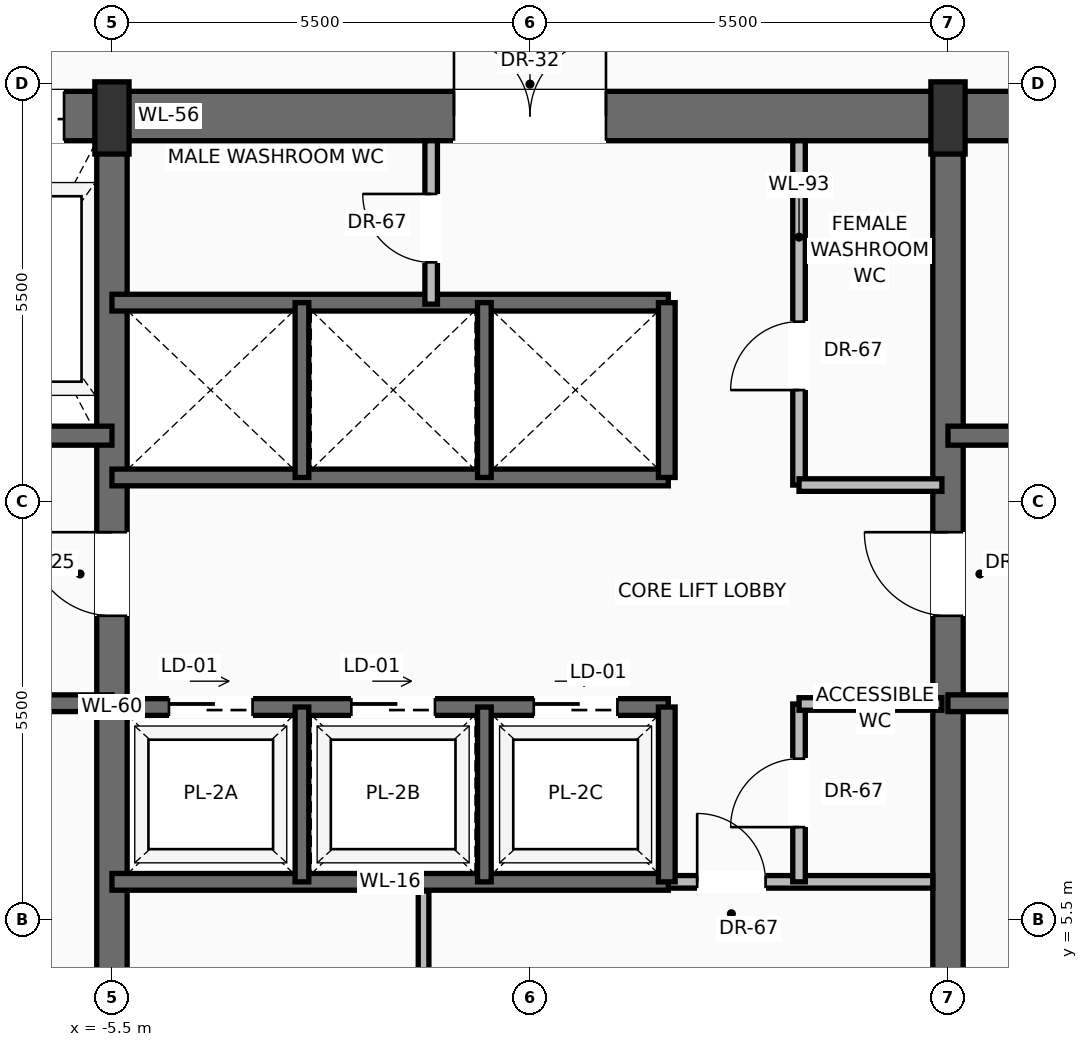
"""IFC4 building model, lengths in metres.
Left out: names, types, materials, properties, quantities, classifications, styles, units other than length and angle.
Written with IfcOpenShell. Run it as: python <this file> out.ifc"""

import sys

from ifc_helpers import new_model, si_unit, direction, frame, frame_2d, origin, origin_2d, place, context, subcontext, project, spatial, rectangle, extrude, source, transform, mapped, element, fill, save


model = new_model("IFC4")
c1 = context("Model", 3, precision=1e-05, world=origin(), true_north=direction((0.0, 1.0)))
c2 = subcontext(c1, "Body", "Model", "MODEL_VIEW")
j1 = project(units=[si_unit("LENGTHUNIT", "METRE"), si_unit("PLANEANGLEUNIT", "RADIAN")], contexts=[c1])
p1 = place(None, origin())
s1 = spatial("IfcSite", under=j1, at=p1, CompositionType="ELEMENT")
p2 = place(p1, origin())
s2 = spatial("IfcBuilding", under=s1, at=p2, CompositionType="ELEMENT")
p3 = place(p2, frame((0.0, 0.0, 136.7)))
s3 = spatial("IfcBuildingStorey", under=s2, at=p3, CompositionType="ELEMENT", Elevation=136.7)
p4 = place(p3, frame((-10.8, 16.075, 0.0), z_axis=(0.0, 0.0, 1.0), x_axis=(1.0, 0.0, 0.0)))
e1 = element("IfcWall", 1, at=p4, inside=s3, PredefinedType="SHEAR", context=c2, shape_type="SweptSolid", body=[
    extrude(rectangle(XDim=21.6, YDim=0.65, at=frame_2d((10.8, 0.0))), origin(), (0.0, 0.0, 1.0), 3.47),
])
p5 = place(p4, frame((3.37, 0.0, 0.0)))
e2 = element("IfcOpeningElement", 2, at=p5, cuts=e1, PredefinedType="OPENING", context=c2, shape_type="SweptSolid", body=[
    extrude(rectangle(XDim=1.3, YDim=2.3, at=frame_2d((0.65, 1.15))), frame((0.0, 0.335, 0.0), z_axis=(0.0, -1.0, 0.0), x_axis=(1.0, 0.0, 0.0)), (0.0, 0.0, 1.0), 0.67),
])
p6 = place(p4, frame((9.8, 0.0, 0.0)))
e3 = element("IfcOpeningElement", 3, at=p6, cuts=e1, PredefinedType="OPENING", context=c2, shape_type="SweptSolid", body=[
    extrude(rectangle(XDim=2.0, YDim=2.4, at=frame_2d((1.0, 1.2))), frame((0.0, 0.335, 0.0), z_axis=(0.0, -1.0, 0.0), x_axis=(1.0, 0.0, 0.0)), (0.0, 0.0, 1.0), 0.67),
])
p7 = place(p3, frame((-5.5, 0.525, 0.0), z_axis=(0.0, 0.0, 1.0), x_axis=(0.0, 1.0, 0.0)))
e4 = element("IfcWall", 4, at=p7, inside=s3, PredefinedType="SHEAR", context=c2, shape_type="SweptSolid", body=[
    extrude(rectangle(XDim=15.55, YDim=0.4, at=frame_2d((7.775, 0.0))), origin(), (0.0, 0.0, 1.0), 3.47),
])
p8 = place(p7, frame((8.975, 0.0, 0.0)))
e5 = element("IfcOpeningElement", 5, at=p8, cuts=e4, PredefinedType="OPENING", context=c2, shape_type="SweptSolid", body=[
    extrude(rectangle(XDim=1.1, YDim=2.2, at=frame_2d((0.55, 1.1))), frame((0.0, 0.21, 0.0), z_axis=(0.0, -1.0, 0.0), x_axis=(1.0, 0.0, 0.0)), (0.0, 0.0, 1.0), 0.42),
])
p9 = place(p3, frame((5.5, 0.525, 0.0), z_axis=(0.0, 0.0, 1.0), x_axis=(0.0, 1.0, 0.0)))
e6 = element("IfcWall", 6, at=p9, inside=s3, PredefinedType="SHEAR", context=c2, shape_type="SweptSolid", body=[
    extrude(rectangle(XDim=15.55, YDim=0.4, at=frame_2d((7.775, 0.0))), origin(), (0.0, 0.0, 1.0), 3.47),
])
p10 = place(p9, frame((8.975, 0.0, 0.0)))
e7 = element("IfcOpeningElement", 7, at=p10, cuts=e6, PredefinedType="OPENING", context=c2, shape_type="SweptSolid", body=[
    extrude(rectangle(XDim=1.1, YDim=2.2, at=frame_2d((0.55, 1.1))), frame((0.0, 0.21, 0.0), z_axis=(0.0, -1.0, 0.0), x_axis=(1.0, 0.0, 0.0)), (0.0, 0.0, 1.0), 0.42),
])
m1 = source(origin(), c2, "Body", "SweptSolid", [
    extrude(rectangle(XDim=0.45, YDim=0.95, at=origin_2d()), origin(), (0.0, 0.0, 1.0), 3.7),
])
for number, where, z_axis, x_axis in (
    (8, (-5.5, 16.05, 0.0), (0.0, 0.0, 1.0), (1.0, 0.0, 0.0)),
    (9, (5.5, 16.05, 0.0), (0.0, 0.0, 1.0), (1.0, 0.0, 0.0)),
):
    element("IfcColumn", number, at=place(p3, frame(where, z_axis=z_axis, x_axis=x_axis)), inside=s3, PredefinedType="PILASTER", context=c2, shape_type="MappedRepresentation", body=[
        mapped(m1, transform((0.0, 0.0, 0.0), scale=1.0)),
    ])
p11 = place(p3, frame((-5.5, 8.35, 0.0), z_axis=(0.0, 0.0, 1.0), x_axis=(-1.0, 0.0, 0.0)))
e10 = element("IfcWall", 10, at=p11, inside=s3, PredefinedType="SOLIDWALL", context=c2, shape_type="SweptSolid", body=[
    extrude(rectangle(XDim=4.65, YDim=0.22, at=frame_2d((2.325, 0.0))), origin(), (0.0, 0.0, 1.0), 3.47),
])
p12 = place(p11, frame((2.5, 0.0, 0.0)))
e11 = element("IfcOpeningElement", 11, at=p12, cuts=e10, PredefinedType="OPENING", context=c2, shape_type="SweptSolid", body=[
    extrude(rectangle(XDim=1.15, YDim=2.2, at=frame_2d((0.575, 1.1))), frame((0.0, 0.12, 0.0), z_axis=(0.0, -1.0, 0.0), x_axis=(1.0, 0.0, 0.0)), (0.0, 0.0, 1.0), 0.24),
])
p13 = place(p3, frame((-5.5, 11.87, 0.0), z_axis=(0.0, 0.0, 1.0), x_axis=(-1.0, 0.0, 0.0)))
e12 = element("IfcWall", 12, at=p13, inside=s3, PredefinedType="SOLIDWALL", context=c2, shape_type="SweptSolid", body=[
    extrude(rectangle(XDim=4.65, YDim=0.25, at=frame_2d((2.325, 0.0))), origin(), (0.0, 0.0, 1.0), 3.47),
])
p14 = place(p13, frame((2.95, 0.0, 0.0)))
e13 = element("IfcOpeningElement", 13, at=p14, cuts=e12, PredefinedType="OPENING", context=c2, shape_type="SweptSolid", body=[
    extrude(rectangle(XDim=1.2, YDim=2.25, at=frame_2d((0.6, 1.125))), frame((0.0, 0.135, 0.0), z_axis=(0.0, -1.0, 0.0), x_axis=(1.0, 0.0, 0.0)), (0.0, 0.0, 1.0), 0.27),
])
p15 = place(p3, frame((10.15, 8.35, 0.0), z_axis=(0.0, 0.0, 1.0), x_axis=(-1.0, 0.0, 0.0)))
e14 = element("IfcWall", 14, at=p15, inside=s3, PredefinedType="SOLIDWALL", context=c2, shape_type="SweptSolid", body=[
    extrude(rectangle(XDim=4.65, YDim=0.22, at=frame_2d((2.325, 0.0))), origin(), (0.0, 0.0, 1.0), 3.47),
])
p16 = place(p15, frame((1.0, 0.0, 0.0)))
e15 = element("IfcOpeningElement", 15, at=p16, cuts=e14, PredefinedType="OPENING", context=c2, shape_type="SweptSolid", body=[
    extrude(rectangle(XDim=1.15, YDim=2.2, at=frame_2d((0.575, 1.1))), frame((0.0, 0.12, 0.0), z_axis=(0.0, -1.0, 0.0), x_axis=(1.0, 0.0, 0.0)), (0.0, 0.0, 1.0), 0.24),
])
p17 = place(p3, frame((10.15, 11.87, 0.0), z_axis=(0.0, 0.0, 1.0), x_axis=(-1.0, 0.0, 0.0)))
e16 = element("IfcWall", 16, at=p17, inside=s3, PredefinedType="SOLIDWALL", context=c2, shape_type="SweptSolid", body=[
    extrude(rectangle(XDim=4.65, YDim=0.25, at=frame_2d((2.325, 0.0))), origin(), (0.0, 0.0, 1.0), 3.47),
])
p18 = place(p17, frame((0.5, 0.0, 0.0)))
e17 = element("IfcOpeningElement", 17, at=p18, cuts=e16, PredefinedType="OPENING", context=c2, shape_type="SweptSolid", body=[
    extrude(rectangle(XDim=1.2, YDim=2.25, at=frame_2d((0.6, 1.125))), frame((0.0, 0.135, 0.0), z_axis=(0.0, -1.0, 0.0), x_axis=(1.0, 0.0, 0.0)), (0.0, 0.0, 1.0), 0.27),
])
p19 = place(p3, frame((1.82, 6.0, 0.0), z_axis=(0.0, 0.0, 1.0), x_axis=(1.0, 0.0, 0.0)))
e18 = element("IfcWall", 18, at=p19, inside=s3, PredefinedType="PARTITIONING", context=c2, shape_type="SweptSolid", body=[
    extrude(rectangle(XDim=3.48, YDim=0.165, at=frame_2d((1.74, 0.0))), origin(), (0.0, 0.0, 1.0), 3.462),
])
p20 = place(p19, frame((0.38, 0.0, 0.0)))
e19 = element("IfcOpeningElement", 19, at=p20, cuts=e18, PredefinedType="OPENING", context=c2, shape_type="SweptSolid", body=[
    extrude(rectangle(XDim=0.9, YDim=2.1, at=frame_2d((0.45, 1.05))), frame((0.0, 0.093, 0.0), z_axis=(0.0, -1.0, 0.0), x_axis=(1.0, 0.0, 0.0)), (0.0, 0.0, 1.0), 0.185),
])
p21 = place(p3, frame((-1.4, 0.85, 0.0), z_axis=(0.0, 0.0, 1.0), x_axis=(0.0, 1.0, 0.0)))
e20 = element("IfcWall", 20, at=p21, inside=s3, PredefinedType="PARTITIONING", context=c2, shape_type="SweptSolid", body=[
    extrude(rectangle(XDim=5.03, YDim=0.14, at=frame_2d((2.515, 0.0))), origin(), (0.0, 0.0, 1.0), 3.462),
])
p22 = place(p21, frame((2.1, 0.0, 0.0)))
e21 = element("IfcOpeningElement", 21, at=p22, cuts=e20, PredefinedType="OPENING", context=c2, shape_type="SweptSolid", body=[
    extrude(rectangle(XDim=0.9, YDim=2.1, at=frame_2d((0.45, 1.05))), frame((0.0, 0.08, 0.0), z_axis=(0.0, -1.0, 0.0), x_axis=(1.0, 0.0, 0.0)), (0.0, 0.0, 1.0), 0.16),
])
p23 = place(p3, frame((3.54, 6.0, 0.0), z_axis=(0.0, 0.0, 1.0), x_axis=(0.0, 1.0, 0.0)))
e22 = element("IfcWall", 22, at=p23, inside=s3, PredefinedType="PARTITIONING", context=c2, shape_type="SweptSolid", body=[
    extrude(rectangle(XDim=2.34, YDim=0.165, at=frame_2d((1.17, 0.0))), origin(), (0.0, 0.0, 1.0), 3.462),
])
p24 = place(p23, frame((0.72, 0.0, 0.0)))
e23 = element("IfcOpeningElement", 23, at=p24, cuts=e22, PredefinedType="OPENING", context=c2, shape_type="SweptSolid", body=[
    extrude(rectangle(XDim=0.9, YDim=2.1, at=frame_2d((0.45, 1.05))), frame((0.0, 0.093, 0.0), z_axis=(0.0, -1.0, 0.0), x_axis=(1.0, 0.0, 0.0)), (0.0, 0.0, 1.0), 0.185),
])
p25 = place(p3, frame((3.54, 8.34, 0.0), z_axis=(0.0, 0.0, 1.0), x_axis=(1.0, 0.0, 0.0)))
e24 = element("IfcWall", 24, at=p25, inside=s3, PredefinedType="PARTITIONING", context=c2, shape_type="SweptSolid", body=[
    extrude(rectangle(XDim=1.88, YDim=0.165, at=frame_2d((0.94, 0.0))), origin(), (0.0, 0.0, 1.0), 3.462),
])
p26 = place(p3, frame((-5.5, 6.0, 0.0), z_axis=(0.0, 0.0, 1.0), x_axis=(1.0, 0.0, 0.0)))
e25 = element("IfcWall", 25, at=p26, inside=s3, PredefinedType="SOLIDWALL", context=c2, shape_type="SweptSolid", body=[
    extrude(rectangle(XDim=7.32, YDim=0.22, at=frame_2d((3.66, 0.0))), origin(), (0.0, 0.0, 1.0), 3.47),
])
p27 = place(p3, frame((-5.5, 8.3, 0.0), z_axis=(0.0, 0.0, 1.0), x_axis=(1.0, 0.0, 0.0)))
e26 = element("IfcWall", 26, at=p27, inside=s3, PredefinedType="SOLIDWALL", context=c2, shape_type="SweptSolid", body=[
    extrude(rectangle(XDim=7.32, YDim=0.22, at=frame_2d((3.66, 0.0))), origin(), (0.0, 0.0, 1.0), 3.47),
])
p28 = place(p27, frame((0.75, 0.0, 0.0)))
e27 = element("IfcOpeningElement", 27, at=p28, cuts=e26, PredefinedType="OPENING", context=c2, shape_type="SweptSolid", body=[
    extrude(rectangle(XDim=1.1, YDim=2.2, at=frame_2d((0.55, 1.1))), frame((0.0, 0.12, 0.0), z_axis=(0.0, -1.0, 0.0), x_axis=(1.0, 0.0, 0.0)), (0.0, 0.0, 1.0), 0.24),
])
p29 = place(p27, frame((3.15, 0.0, 0.0)))
e28 = element("IfcOpeningElement", 28, at=p29, cuts=e26, PredefinedType="OPENING", context=c2, shape_type="SweptSolid", body=[
    extrude(rectangle(XDim=1.1, YDim=2.2, at=frame_2d((0.55, 1.1))), frame((0.0, 0.12, 0.0), z_axis=(0.0, -1.0, 0.0), x_axis=(1.0, 0.0, 0.0)), (0.0, 0.0, 1.0), 0.24),
])
p30 = place(p27, frame((5.55, 0.0, 0.0)))
e29 = element("IfcOpeningElement", 29, at=p30, cuts=e26, PredefinedType="OPENING", context=c2, shape_type="SweptSolid", body=[
    extrude(rectangle(XDim=1.1, YDim=2.2, at=frame_2d((0.55, 1.1))), frame((0.0, 0.12, 0.0), z_axis=(0.0, -1.0, 0.0), x_axis=(1.0, 0.0, 0.0)), (0.0, 0.0, 1.0), 0.24),
])
p31 = place(p3, frame((1.8, 6.0, 0.0), z_axis=(0.0, 0.0, 1.0), x_axis=(0.0, 1.0, 0.0)))
e30 = element("IfcWall", 30, at=p31, inside=s3, PredefinedType="SOLIDWALL", context=c2, shape_type="SweptSolid", body=[
    extrude(rectangle(XDim=2.3, YDim=0.22, at=frame_2d((1.15, 0.0))), origin(), (0.0, 0.0, 1.0), 3.47),
])
for number, where, z_axis, x_axis in (
    (31, (-3.0, 6.0, 0.0), (0.0, 0.0, 1.0), (0.0, 1.0, 0.0)),
    (32, (-0.6, 6.0, 0.0), (0.0, 0.0, 1.0), (0.0, 1.0, 0.0)),
):
    element("IfcWall", number, at=place(p3, frame(where, z_axis=z_axis, x_axis=x_axis)), inside=s3, PredefinedType="SOLIDWALL", context=c2, shape_type="SweptSolid", body=[
        extrude(rectangle(XDim=2.3, YDim=0.18, at=frame_2d((1.15, 0.0))), origin(), (0.0, 0.0, 1.0), 3.47),
    ])
for number, where, z_axis, x_axis in (
    (33, (-5.5, 11.32, 0.0), (0.0, 0.0, 1.0), (1.0, 0.0, 0.0)),
    (34, (-5.5, 13.62, 0.0), (0.0, 0.0, 1.0), (1.0, 0.0, 0.0)),
):
    element("IfcWall", number, at=place(p3, frame(where, z_axis=z_axis, x_axis=x_axis)), inside=s3, PredefinedType="SOLIDWALL", context=c2, shape_type="SweptSolid", body=[
        extrude(rectangle(XDim=7.32, YDim=0.22, at=frame_2d((3.66, 0.0))), origin(), (0.0, 0.0, 1.0), 3.47),
    ])
p32 = place(p3, frame((1.8, 11.32, 0.0), z_axis=(0.0, 0.0, 1.0), x_axis=(0.0, 1.0, 0.0)))
e35 = element("IfcWall", 35, at=p32, inside=s3, PredefinedType="SOLIDWALL", context=c2, shape_type="SweptSolid", body=[
    extrude(rectangle(XDim=2.3, YDim=0.22, at=frame_2d((1.15, 0.0))), origin(), (0.0, 0.0, 1.0), 3.47),
])
for number, where, z_axis, x_axis in (
    (36, (-3.0, 11.32, 0.0), (0.0, 0.0, 1.0), (0.0, 1.0, 0.0)),
    (37, (-0.6, 11.32, 0.0), (0.0, 0.0, 1.0), (0.0, 1.0, 0.0)),
):
    element("IfcWall", number, at=place(p3, frame(where, z_axis=z_axis, x_axis=x_axis)), inside=s3, PredefinedType="SOLIDWALL", context=c2, shape_type="SweptSolid", body=[
        extrude(rectangle(XDim=2.3, YDim=0.18, at=frame_2d((1.15, 0.0))), origin(), (0.0, 0.0, 1.0), 3.47),
    ])
p33 = place(p3, frame((-1.3, 13.6, 0.0), z_axis=(0.0, 0.0, 1.0), x_axis=(0.0, 1.0, 0.0)))
e38 = element("IfcWall", 38, at=p33, inside=s3, PredefinedType="PARTITIONING", context=c2, shape_type="SweptSolid", body=[
    extrude(rectangle(XDim=2.15, YDim=0.165, at=frame_2d((1.075, 0.0))), origin(), (0.0, 0.0, 1.0), 3.462),
])
p34 = place(p33, frame((0.55, 0.0, 0.0)))
e39 = element("IfcOpeningElement", 39, at=p34, cuts=e38, PredefinedType="OPENING", context=c2, shape_type="SweptSolid", body=[
    extrude(rectangle(XDim=0.9, YDim=2.1, at=frame_2d((0.45, 1.05))), frame((0.0, 0.093, 0.0), z_axis=(0.0, -1.0, 0.0), x_axis=(1.0, 0.0, 0.0)), (0.0, 0.0, 1.0), 0.185),
])
p35 = place(p3, frame((3.54, 11.22, 0.0), z_axis=(0.0, 0.0, 1.0), x_axis=(0.0, 1.0, 0.0)))
e40 = element("IfcWall", 40, at=p35, inside=s3, PredefinedType="PARTITIONING", context=c2, shape_type="SweptSolid", body=[
    extrude(rectangle(XDim=4.53, YDim=0.165, at=frame_2d((2.265, 0.0))), origin(), (0.0, 0.0, 1.0), 3.462),
])
p36 = place(p35, frame((1.25, 0.0, 0.0)))
e41 = element("IfcOpeningElement", 41, at=p36, cuts=e40, PredefinedType="OPENING", context=c2, shape_type="SweptSolid", body=[
    extrude(rectangle(XDim=0.9, YDim=2.1, at=frame_2d((0.45, 1.05))), frame((0.0, 0.093, 0.0), z_axis=(0.0, -1.0, 0.0), x_axis=(1.0, 0.0, 0.0)), (0.0, 0.0, 1.0), 0.185),
])
p37 = place(p3, frame((3.54, 11.22, 0.0), z_axis=(0.0, 0.0, 1.0), x_axis=(1.0, 0.0, 0.0)))
e42 = element("IfcWall", 42, at=p37, inside=s3, PredefinedType="PARTITIONING", context=c2, shape_type="SweptSolid", body=[
    extrude(rectangle(XDim=1.88, YDim=0.165, at=frame_2d((0.94, 0.0))), origin(), (0.0, 0.0, 1.0), 3.462),
])
m2 = source(origin(), c2, "Body", "SweptSolid", [
    extrude(rectangle(XDim=1.1, YDim=2.2, at=frame_2d((0.55, 1.1))), frame((0.0, 0.025, 0.0), z_axis=(0.0, -1.0, 0.0), x_axis=(1.0, 0.0, 0.0)), (0.0, 0.0, 1.0), 0.05),
])
p38 = place(p8, origin())
e43 = element("IfcDoor", 43, at=p38, inside=s3, OperationType="SINGLE_SWING_RIGHT", PredefinedType="DOOR", context=c2, shape_type="MappedRepresentation", body=[
    mapped(m2, transform((0.0, 0.0, 0.0), scale=1.0)),
])
fill(e5, e43)
m3 = source(origin(), c2, "Body", "SweptSolid", [
    extrude(rectangle(XDim=1.3, YDim=2.3, at=frame_2d((0.65, 1.15))), frame((0.0, 0.025, 0.0), z_axis=(0.0, -1.0, 0.0), x_axis=(1.0, 0.0, 0.0)), (0.0, 0.0, 1.0), 0.05),
])
p39 = place(p5, origin())
e44 = element("IfcDoor", 44, at=p39, inside=s3, OperationType="SLIDING_TO_RIGHT", PredefinedType="DOOR", context=c2, shape_type="MappedRepresentation", body=[
    mapped(m3, transform((0.0, 0.0, 0.0), scale=1.0)),
])
fill(e2, e44)
p40 = place(p10, origin())
e45 = element("IfcDoor", 45, at=p40, inside=s3, OperationType="SINGLE_SWING_RIGHT", PredefinedType="DOOR", context=c2, shape_type="MappedRepresentation", body=[
    mapped(m2, transform((0.0, 0.0, 0.0), scale=1.0)),
])
fill(e7, e45)
m4 = source(origin(), c2, "Body", "SweptSolid", [
    extrude(rectangle(XDim=2.0, YDim=2.4, at=frame_2d((1.0, 1.2))), frame((0.0, 0.025, 0.0), z_axis=(0.0, -1.0, 0.0), x_axis=(1.0, 0.0, 0.0)), (0.0, 0.0, 1.0), 0.05),
])
p41 = place(p6, origin())
e46 = element("IfcDoor", 46, at=p41, inside=s3, OperationType="DOUBLE_DOOR_SINGLE_SWING", PredefinedType="DOOR", context=c2, shape_type="MappedRepresentation", body=[
    mapped(m4, transform((0.0, 0.0, 0.0), scale=1.0)),
])
fill(e3, e46)
m5 = source(origin(), c2, "Body", "SweptSolid", [
    extrude(rectangle(XDim=0.9, YDim=2.1, at=frame_2d((0.45, 1.05))), frame((0.0, 0.025, 0.0), z_axis=(0.0, -1.0, 0.0), x_axis=(1.0, 0.0, 0.0)), (0.0, 0.0, 1.0), 0.05),
])
p42 = place(p20, origin())
e47 = element("IfcDoor", 47, at=p42, inside=s3, OperationType="SINGLE_SWING_LEFT", PredefinedType="DOOR", context=c2, shape_type="MappedRepresentation", body=[
    mapped(m5, transform((0.0, 0.0, 0.0), scale=1.0)),
])
fill(e19, e47)
p43 = place(p24, origin())
e48 = element("IfcDoor", 48, at=p43, inside=s3, OperationType="SINGLE_SWING_LEFT", PredefinedType="DOOR", context=c2, shape_type="MappedRepresentation", body=[
    mapped(m5, transform((0.0, 0.0, 0.0), scale=1.0)),
])
fill(e23, e48)
m6 = source(origin(), c2, "Body", "SweptSolid", [
    extrude(rectangle(XDim=1.1, YDim=2.2, at=frame_2d((0.55, 1.1))), frame((0.0, 0.025, 0.0), z_axis=(0.0, -1.0, 0.0), x_axis=(1.0, 0.0, 0.0)), (0.0, 0.0, 1.0), 0.05),
])
p44 = place(p28, origin())
e49 = element("IfcDoor", 49, at=p44, inside=s3, OperationType="SLIDING_TO_LEFT", PredefinedType="DOOR", context=c2, shape_type="MappedRepresentation", body=[
    mapped(m6, transform((0.0, 0.0, 0.0), scale=1.0)),
])
fill(e27, e49)
p45 = place(p29, origin())
e50 = element("IfcDoor", 50, at=p45, inside=s3, OperationType="SLIDING_TO_LEFT", PredefinedType="DOOR", context=c2, shape_type="MappedRepresentation", body=[
    mapped(m6, transform((0.0, 0.0, 0.0), scale=1.0)),
])
fill(e28, e50)
p46 = place(p30, origin())
e51 = element("IfcDoor", 51, at=p46, inside=s3, OperationType="SLIDING_TO_LEFT", PredefinedType="DOOR", context=c2, shape_type="MappedRepresentation", body=[
    mapped(m6, transform((0.0, 0.0, 0.0), scale=1.0)),
])
fill(e29, e51)
p47 = place(p34, origin())
e52 = element("IfcDoor", 52, at=p47, inside=s3, OperationType="SINGLE_SWING_RIGHT", PredefinedType="DOOR", context=c2, shape_type="MappedRepresentation", body=[
    mapped(m5, transform((0.0, 0.0, 0.0), scale=1.0)),
])
fill(e39, e52)
p48 = place(p36, origin())
e53 = element("IfcDoor", 53, at=p48, inside=s3, OperationType="SINGLE_SWING_LEFT", PredefinedType="DOOR", context=c2, shape_type="MappedRepresentation", body=[
    mapped(m5, transform((0.0, 0.0, 0.0), scale=1.0)),
])
fill(e41, e53)
save(model, sys.argv[1])
